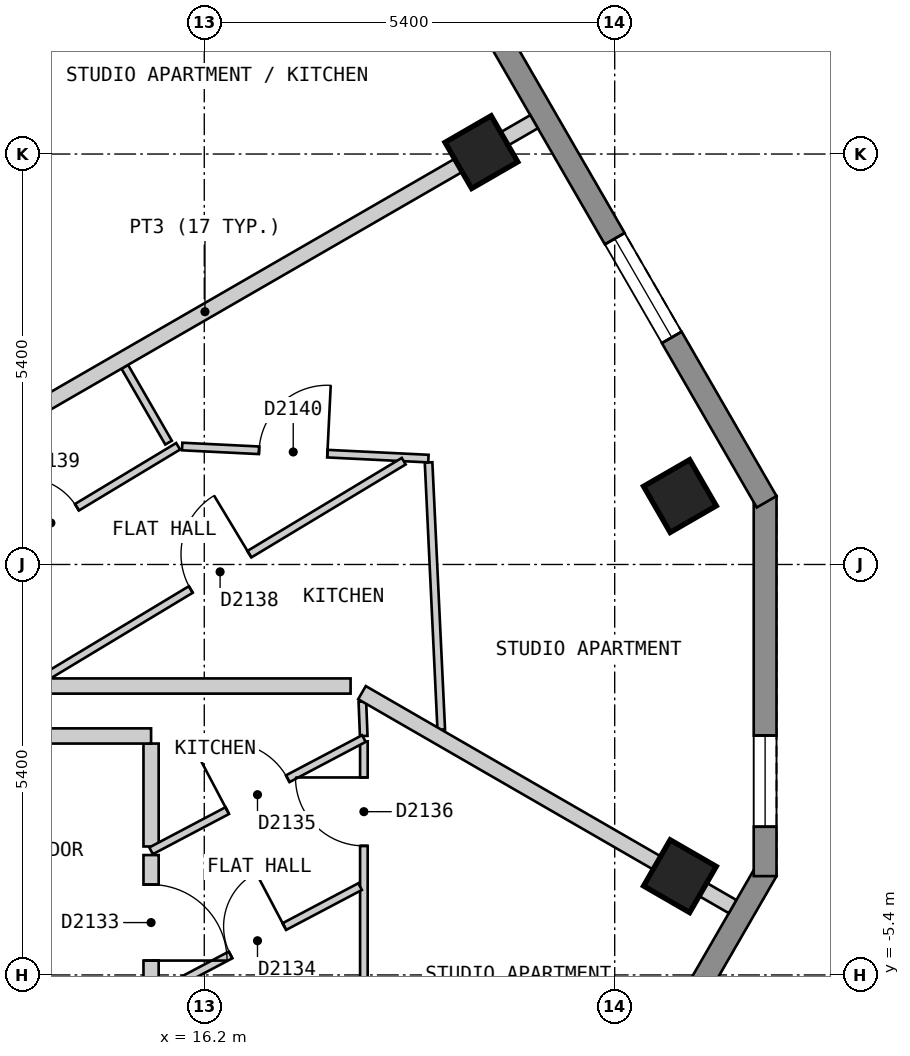
"""IFC4 building model, lengths in metres.
Left out: names, types, materials, properties, quantities, classifications, styles, units other than length and angle.
Written with IfcOpenShell. Run it as: python <this file> out.ifc"""

import sys

from ifc_helpers import new_model, si_unit, direction, frame, frame_2d, origin, origin_2d, place, context, subcontext, project, spatial, polyline, rectangle, outline, extrude, element, fill, save


model = new_model("IFC4")
c1 = context("Model", 3, precision=1e-05, world=origin(), true_north=direction((0.0, 1.0)))
c2 = subcontext(c1, "Body", "Model", "MODEL_VIEW")
j1 = project(units=[si_unit("LENGTHUNIT", "METRE"), si_unit("PLANEANGLEUNIT", "RADIAN")], contexts=[c1])
p1 = place(None, origin())
s1 = spatial("IfcSite", under=j1, at=p1, CompositionType="ELEMENT")
p2 = place(p1, origin())
s2 = spatial("IfcBuilding", under=s1, at=p2, CompositionType="ELEMENT")
p3 = place(p2, frame((0.0, 0.0, 205.8)))
s3 = spatial("IfcBuildingStorey", under=s2, at=p3, CompositionType="ELEMENT", Elevation=205.8)
for number, where, z_axis, x_axis in (
    (1, (22.458, -4.101, 0.0), (0.0, 0.0, 1.0), (0.5, 0.866, 0.0)),
    (2, (22.458, 0.9, 0.0), (0.0, 0.0, 1.0), (-0.5, 0.866, 0.0)),
    (3, (19.846, 5.425, 0.0), (0.0, 0.0, 1.0), (-0.5, 0.866, 0.0)),
):
    element("IfcColumn", number, at=place(p3, frame(where, z_axis=z_axis, x_axis=x_axis)), inside=s3, PredefinedType="COLUMN", context=c2, shape_type="SweptSolid", body=[
        extrude(rectangle(XDim=0.7, YDim=0.7, at=origin_2d()), origin(), (0.0, 0.0, 1.0), 3.0),
    ])
p4 = place(p3, frame((15.285, -18.425, 0.0), z_axis=(0.0, 0.0, 1.0), x_axis=(0.500012653391, 0.866018098222, 0.0)))
e4 = element("IfcWall", 4, at=p4, inside=s3, PredefinedType="SOLIDWALL", context=c2, shape_type="SweptSolid", body=[
    extrude(outline(polyline([(0.0, -0.15), (16.628, -0.15), (16.548, 0.15), (0.08, 0.15), (0.0, -0.15)])), origin(), (0.0, 0.0, 1.0), 2.7),
])
p5 = place(p4, frame((2.444, 0.0, 0.15)))
e5 = element("IfcOpeningElement", 5, at=p5, cuts=e4, PredefinedType="OPENING", context=c2, shape_type="SweptSolid", body=[
    extrude(rectangle(XDim=1.5, YDim=2.1, at=frame_2d((0.75, 1.05))), frame((0.0, 0.16, 0.0), z_axis=(0.0, -1.0, 0.0), x_axis=(1.0, 0.0, 0.0)), (0.0, 0.0, 1.0), 0.32),
])
p6 = place(p4, frame((7.564, 0.0, 0.15)))
e6 = element("IfcOpeningElement", 6, at=p6, cuts=e4, PredefinedType="OPENING", context=c2, shape_type="SweptSolid", body=[
    extrude(rectangle(XDim=1.5, YDim=2.1, at=frame_2d((0.75, 1.05))), frame((0.0, 0.16, 0.0), z_axis=(0.0, -1.0, 0.0), x_axis=(1.0, 0.0, 0.0)), (0.0, 0.0, 1.0), 0.32),
])
p7 = place(p4, frame((12.682, 0.0, 0.15)))
e7 = element("IfcOpeningElement", 7, at=p7, cuts=e4, PredefinedType="OPENING", context=c2, shape_type="SweptSolid", body=[
    extrude(rectangle(XDim=1.5, YDim=2.1, at=frame_2d((0.75, 1.05))), frame((0.0, 0.16, 0.0), z_axis=(0.0, -1.0, 0.0), x_axis=(1.0, 0.0, 0.0)), (0.0, 0.0, 1.0), 0.32),
])
p8 = place(p3, frame((23.579, -4.1, 0.0), z_axis=(0.0, 0.0, 1.0), x_axis=(0.0, 1.0, 0.0)))
e8 = element("IfcWall", 8, at=p8, inside=s3, PredefinedType="SOLIDWALL", context=c2, shape_type="SweptSolid", body=[
    extrude(outline(polyline([(0.0, -0.15), (5.0, -0.15), (4.92, 0.15), (0.08, 0.15), (0.0, -0.15)])), origin(), (0.0, 0.0, 1.0), 2.7),
])
p9 = place(p8, frame((0.65, 0.0, 0.15)))
e9 = element("IfcOpeningElement", 9, at=p9, cuts=e8, PredefinedType="OPENING", context=c2, shape_type="SweptSolid", body=[
    extrude(rectangle(XDim=1.2, YDim=2.1, at=frame_2d((0.6, 1.05))), frame((0.0, 0.16, 0.0), z_axis=(0.0, -1.0, 0.0), x_axis=(1.0, 0.0, 0.0)), (0.0, 0.0, 1.0), 0.32),
])
p10 = place(p3, frame((23.599, 0.825, 0.0), z_axis=(0.0, 0.0, 1.0), x_axis=(-0.500003656944, 0.866023292436, 0.0)))
e10 = element("IfcWall", 10, at=p10, inside=s3, PredefinedType="SOLIDWALL", context=c2, shape_type="SweptSolid", body=[
    extrude(outline(polyline([(0.0, -0.15), (22.17, -0.15), (22.09, 0.15), (0.08, 0.15), (0.0, -0.15)])), origin(), (0.0, 0.0, 1.0), 2.7),
])
p11 = place(p10, frame((2.497, 0.0, 0.15)))
e11 = element("IfcOpeningElement", 11, at=p11, cuts=e10, PredefinedType="OPENING", context=c2, shape_type="SweptSolid", body=[
    extrude(rectangle(XDim=1.5, YDim=2.1, at=frame_2d((0.75, 1.05))), frame((0.0, 0.16, 0.0), z_axis=(0.0, -1.0, 0.0), x_axis=(1.0, 0.0, 0.0)), (0.0, 0.0, 1.0), 0.32),
])
p12 = place(p10, frame((7.723, 0.0, 0.15)))
e12 = element("IfcOpeningElement", 12, at=p12, cuts=e10, PredefinedType="OPENING", context=c2, shape_type="SweptSolid", body=[
    extrude(rectangle(XDim=1.5, YDim=2.1, at=frame_2d((0.75, 1.05))), frame((0.0, 0.16, 0.0), z_axis=(0.0, -1.0, 0.0), x_axis=(1.0, 0.0, 0.0)), (0.0, 0.0, 1.0), 0.32),
])
p13 = place(p10, frame((12.948, 0.0, 0.15)))
e13 = element("IfcOpeningElement", 13, at=p13, cuts=e10, PredefinedType="OPENING", context=c2, shape_type="SweptSolid", body=[
    extrude(rectangle(XDim=1.5, YDim=2.1, at=frame_2d((0.75, 1.05))), frame((0.0, 0.16, 0.0), z_axis=(0.0, -1.0, 0.0), x_axis=(1.0, 0.0, 0.0)), (0.0, 0.0, 1.0), 0.32),
])
p14 = place(p10, frame((18.173, 0.0, 0.15)))
e14 = element("IfcOpeningElement", 14, at=p14, cuts=e10, PredefinedType="OPENING", context=c2, shape_type="SweptSolid", body=[
    extrude(rectangle(XDim=1.5, YDim=2.1, at=frame_2d((0.75, 1.05))), frame((0.0, 0.16, 0.0), z_axis=(0.0, -1.0, 0.0), x_axis=(1.0, 0.0, 0.0)), (0.0, 0.0, 1.0), 0.32),
])
p15 = place(p3, frame((15.5, -2.356, 0.0), z_axis=(0.0, 0.0, 1.0), x_axis=(0.0, -1.0, 0.0)))
e15 = element("IfcWall", 15, at=p15, inside=s3, PredefinedType="PARTITIONING", context=c2, shape_type="SweptSolid", body=[
    extrude(rectangle(XDim=1.354, YDim=0.2, at=frame_2d((0.677, 0.0))), origin(), (0.0, 0.0, 1.0), 2.7),
])
p16 = place(p3, frame((12.902, -2.256, 0.0), z_axis=(0.0, 0.0, 1.0), x_axis=(1.0, 0.0, 0.0)))
e16 = element("IfcWall", 16, at=p16, inside=s3, PredefinedType="PARTITIONING", context=c2, shape_type="SweptSolid", body=[
    extrude(rectangle(XDim=2.598, YDim=0.2, at=frame_2d((1.299, 0.0))), origin(), (0.0, 0.0, 1.0), 2.7),
])
p17 = place(p3, frame((15.5, -5.879, 0.0), z_axis=(0.0, 0.0, 1.0), x_axis=(0.0, 1.0, 0.0)))
e17 = element("IfcWall", 17, at=p17, inside=s3, PredefinedType="PARTITIONING", context=c2, shape_type="SweptSolid", body=[
    extrude(rectangle(XDim=2.056, YDim=0.2, at=frame_2d((1.028, 0.0))), origin(), (0.0, 0.0, 1.0), 2.7),
])
p18 = place(p17, frame((0.668, 0.0, 0.0)))
e18 = element("IfcOpeningElement", 18, at=p18, cuts=e17, PredefinedType="OPENING", context=c2, shape_type="SweptSolid", body=[
    extrude(rectangle(XDim=1.0, YDim=2.1, at=frame_2d((0.5, 1.05))), frame((0.0, 0.11, 0.0), z_axis=(0.0, -1.0, 0.0), x_axis=(1.0, 0.0, 0.0)), (0.0, 0.0, 1.0), 0.22),
])
p19 = place(p3, frame((15.154, 2.601, 0.0), z_axis=(0.0, 0.0, 1.0), x_axis=(0.499808046739, -0.866136199691, 0.0)))
e19 = element("IfcWall", 19, at=p19, inside=s3, PredefinedType="PARTITIONING", context=c2, shape_type="SweptSolid", body=[
    extrude(rectangle(XDim=1.152, YDim=0.1, at=frame_2d((0.576, 0.0))), origin(), (0.0, 0.0, 1.0), 2.7),
])
p20 = place(p3, frame((18.28, -1.804, 0.0), z_axis=(0.0, 0.0, 1.0), x_axis=(0.039839036731, -0.999206110446, 0.0)))
e20 = element("IfcWall", 20, at=p20, inside=s3, PredefinedType="PARTITIONING", context=c2, shape_type="SweptSolid", body=[
    extrude(rectangle(XDim=0.453, YDim=0.1, at=frame_2d((0.227, 0.0))), origin(), (0.0, 0.0, 1.0), 2.7),
])
p21 = place(p3, frame((19.151, 1.343, 0.0), z_axis=(0.0, 0.0, 1.0), x_axis=(0.047509130714, -0.998870803707, 0.0)))
e21 = element("IfcWall", 21, at=p21, inside=s3, PredefinedType="PARTITIONING", context=c2, shape_type="SweptSolid", body=[
    extrude(rectangle(XDim=3.52, YDim=0.1, at=frame_2d((1.76, 0.0))), origin(), (0.0, 0.0, 1.0), 2.7),
])
p22 = place(p3, frame((15.909, 1.552, 0.0), z_axis=(0.0, 0.0, 1.0), x_axis=(0.998799003463, -0.048995414909, 0.0)))
e22 = element("IfcWall", 22, at=p22, inside=s3, PredefinedType="PARTITIONING", context=c2, shape_type="SweptSolid", body=[
    extrude(rectangle(XDim=3.244, YDim=0.1, at=frame_2d((1.622, 0.0))), origin(), (0.0, 0.0, 1.0), 2.7),
])
p23 = place(p22, frame((1.013, 0.0, 0.0)))
e23 = element("IfcOpeningElement", 23, at=p23, cuts=e22, PredefinedType="OPENING", context=c2, shape_type="SweptSolid", body=[
    extrude(rectangle(XDim=0.9, YDim=2.1, at=frame_2d((0.45, 1.05))), frame((0.0, 0.06, 0.0), z_axis=(0.0, -1.0, 0.0), x_axis=(1.0, 0.0, 0.0)), (0.0, 0.0, 1.0), 0.12),
])
p24 = place(p3, frame((18.3, -7.496, 0.0), z_axis=(0.0, 0.0, 1.0), x_axis=(0.0, 1.0, 0.0)))
e24 = element("IfcWall", 24, at=p24, inside=s3, PredefinedType="PARTITIONING", context=c2, shape_type="SweptSolid", body=[
    extrude(rectangle(XDim=5.17, YDim=0.1, at=frame_2d((2.585, 0.0))), origin(), (0.0, 0.0, 1.0), 2.7),
])
p25 = place(p24, frame((3.794, 0.0, 0.0)))
e25 = element("IfcOpeningElement", 25, at=p25, cuts=e24, PredefinedType="OPENING", context=c2, shape_type="SweptSolid", body=[
    extrude(rectangle(XDim=0.9, YDim=2.1, at=frame_2d((0.45, 1.05))), frame((0.0, 0.06, 0.0), z_axis=(0.0, -1.0, 0.0), x_axis=(1.0, 0.0, 0.0)), (0.0, 0.0, 1.0), 0.12),
])
p26 = place(p3, frame((15.5, -3.767, 0.0), z_axis=(0.0, 0.0, 1.0), x_axis=(0.884482889541, 0.466572628976, 0.0)))
e26 = element("IfcWall", 26, at=p26, inside=s3, PredefinedType="PARTITIONING", context=c2, shape_type="SweptSolid", body=[
    extrude(rectangle(XDim=3.166, YDim=0.1, at=frame_2d((1.583, 0.0))), origin(), (0.0, 0.0, 1.0), 2.7),
])
p27 = place(p26, frame((1.133, 0.0, 0.0)))
e27 = element("IfcOpeningElement", 27, at=p27, cuts=e26, PredefinedType="OPENING", context=c2, shape_type="SweptSolid", body=[
    extrude(rectangle(XDim=0.9, YDim=2.1, at=frame_2d((0.45, 1.05))), frame((0.0, 0.06, 0.0), z_axis=(0.0, -1.0, 0.0), x_axis=(1.0, 0.0, 0.0)), (0.0, 0.0, 1.0), 0.12),
])
p28 = place(p3, frame((15.6, -5.636, 0.0), z_axis=(0.0, 0.0, 1.0), x_axis=(0.884468832747, 0.466599275503, 0.0)))
e28 = element("IfcWall", 28, at=p28, inside=s3, PredefinedType="PARTITIONING", context=c2, shape_type="SweptSolid", body=[
    extrude(rectangle(XDim=2.996, YDim=0.1, at=frame_2d((1.498, 0.0))), origin(), (0.0, 0.0, 1.0), 2.7),
])
p29 = place(p28, frame((1.07, 0.0, 0.0)))
e29 = element("IfcOpeningElement", 29, at=p29, cuts=e28, PredefinedType="OPENING", context=c2, shape_type="SweptSolid", body=[
    extrude(rectangle(XDim=0.8, YDim=2.1, at=frame_2d((0.4, 1.05))), frame((0.0, 0.06, 0.0), z_axis=(0.0, -1.0, 0.0), x_axis=(1.0, 0.0, 0.0)), (0.0, 0.0, 1.0), 0.12),
])
p30 = place(p3, frame((12.593, -0.411, 0.0), z_axis=(0.0, 0.0, 1.0), x_axis=(0.856558445359, 0.516050026339, 0.0)))
e30 = element("IfcWall", 30, at=p30, inside=s3, PredefinedType="PARTITIONING", context=c2, shape_type="SweptSolid", body=[
    extrude(rectangle(XDim=3.809, YDim=0.1, at=frame_2d((1.905, 0.0))), origin(), (0.0, 0.0, 1.0), 2.7),
])
p31 = place(p30, frame((1.455, 0.0, 0.0)))
e31 = element("IfcOpeningElement", 31, at=p31, cuts=e30, PredefinedType="OPENING", context=c2, shape_type="SweptSolid", body=[
    extrude(rectangle(XDim=0.8, YDim=2.1, at=frame_2d((0.4, 1.05))), frame((0.0, 0.06, 0.0), z_axis=(0.0, -1.0, 0.0), x_axis=(1.0, 0.0, 0.0)), (0.0, 0.0, 1.0), 0.12),
])
p32 = place(p3, frame((14.081, -1.499, 0.0), z_axis=(0.0, 0.0, 1.0), x_axis=(0.85652273816, 0.516109289798, 0.0)))
e32 = element("IfcWall", 32, at=p32, inside=s3, PredefinedType="PARTITIONING", context=c2, shape_type="SweptSolid", body=[
    extrude(rectangle(XDim=5.537, YDim=0.1, at=frame_2d((2.769, 0.0))), origin(), (0.0, 0.0, 1.0), 2.7),
])
p33 = place(p32, frame((2.267, 0.0, 0.0)))
e33 = element("IfcOpeningElement", 33, at=p33, cuts=e32, PredefinedType="OPENING", context=c2, shape_type="SweptSolid", body=[
    extrude(rectangle(XDim=0.9, YDim=2.1, at=frame_2d((0.45, 1.05))), frame((0.0, 0.06, 0.0), z_axis=(0.0, -1.0, 0.0), x_axis=(1.0, 0.0, 0.0)), (0.0, 0.0, 1.0), 0.12),
])
p34 = place(p3, frame((18.275, -1.686, 0.0), z_axis=(0.0, 0.0, 1.0), x_axis=(0.866041167766, -0.49997269499, 0.0)))
e34 = element("IfcWall", 34, at=p34, inside=s3, PredefinedType="PARTITIONING", context=c2, shape_type="SweptSolid", body=[
    extrude(rectangle(XDim=5.63, YDim=0.2, at=frame_2d((2.815, 0.0))), origin(), (0.0, 0.0, 1.0), 2.7),
])
p35 = place(p3, frame((13.163, -1.599, 0.0), z_axis=(0.0, 0.0, 1.0), x_axis=(1.0, 0.0, 0.0)))
e35 = element("IfcWall", 35, at=p35, inside=s3, PredefinedType="PARTITIONING", context=c2, shape_type="SweptSolid", body=[
    extrude(rectangle(XDim=4.962, YDim=0.2, at=frame_2d((2.481, 0.0))), origin(), (0.0, 0.0, 1.0), 2.7),
])
p36 = place(p3, frame((11.879, 0.826, 0.0), z_axis=(0.0, 0.0, 1.0), x_axis=(0.866065245018, 0.499930986609, 0.0)))
e36 = element("IfcWall", 36, at=p36, inside=s3, PredefinedType="PARTITIONING", context=c2, shape_type="SweptSolid", body=[
    extrude(rectangle(XDim=10.0, YDim=0.2, at=frame_2d((5.0, 0.0))), origin(), (0.0, 0.0, 1.0), 2.7),
])
p37 = place(p3, frame((9.354, 5.401, 0.0), z_axis=(0.0, 0.0, 1.0), x_axis=(0.866018411306, 0.500012111133, 0.0)))
e37 = element("IfcWall", 37, at=p37, inside=s3, PredefinedType="PARTITIONING", context=c2, shape_type="SweptSolid", body=[
    extrude(rectangle(XDim=9.898, YDim=0.2, at=frame_2d((4.949, 0.0))), origin(), (0.0, 0.0, 1.0), 2.7),
])
p38 = place(p9, origin())
e38 = element("IfcWindow", 38, at=p38, inside=s3, PartitioningType="SINGLE_PANEL", PredefinedType="WINDOW", context=c2, shape_type="SweptSolid", body=[
    extrude(rectangle(XDim=1.2, YDim=2.1, at=frame_2d((0.6, 1.05))), frame((0.0, 0.03, 0.0), z_axis=(0.0, -1.0, 0.0), x_axis=(1.0, 0.0, 0.0)), (0.0, 0.0, 1.0), 0.06),
])
fill(e9, e38)
p39 = place(p11, origin())
e39 = element("IfcWindow", 39, at=p39, inside=s3, PartitioningType="SINGLE_PANEL", PredefinedType="WINDOW", context=c2, shape_type="SweptSolid", body=[
    extrude(rectangle(XDim=1.5, YDim=2.1, at=frame_2d((0.75, 1.05))), frame((0.0, 0.03, 0.0), z_axis=(0.0, -1.0, 0.0), x_axis=(1.0, 0.0, 0.0)), (0.0, 0.0, 1.0), 0.06),
])
fill(e11, e39)
p40 = place(p18, origin())
e40 = element("IfcDoor", 40, at=p40, inside=s3, OperationType="SINGLE_SWING_LEFT", PredefinedType="DOOR", context=c2, shape_type="SweptSolid", body=[
    extrude(rectangle(XDim=1.0, YDim=2.1, at=frame_2d((0.5, 1.05))), frame((0.0, 0.025, 0.0), z_axis=(0.0, -1.0, 0.0), x_axis=(1.0, 0.0, 0.0)), (0.0, 0.0, 1.0), 0.05),
])
fill(e18, e40)
p41 = place(p29, origin())
e41 = element("IfcDoor", 41, at=p41, inside=s3, OperationType="SINGLE_SWING_RIGHT", PredefinedType="DOOR", context=c2, shape_type="SweptSolid", body=[
    extrude(rectangle(XDim=0.8, YDim=2.1, at=frame_2d((0.4, 1.05))), frame((0.0, 0.025, 0.0), z_axis=(0.0, -1.0, 0.0), x_axis=(1.0, 0.0, 0.0)), (0.0, 0.0, 1.0), 0.05),
])
fill(e29, e41)
p42 = place(p27, origin())
e42 = element("IfcDoor", 42, at=p42, inside=s3, OperationType="SINGLE_SWING_LEFT", PredefinedType="DOOR", context=c2, shape_type="SweptSolid", body=[
    extrude(rectangle(XDim=0.9, YDim=2.1, at=frame_2d((0.45, 1.05))), frame((0.0, 0.025, 0.0), z_axis=(0.0, -1.0, 0.0), x_axis=(1.0, 0.0, 0.0)), (0.0, 0.0, 1.0), 0.05),
])
fill(e27, e42)
p43 = place(p25, origin())
e43 = element("IfcDoor", 43, at=p43, inside=s3, OperationType="SINGLE_SWING_RIGHT", PredefinedType="DOOR", context=c2, shape_type="SweptSolid", body=[
    extrude(rectangle(XDim=0.9, YDim=2.1, at=frame_2d((0.45, 1.05))), frame((0.0, 0.025, 0.0), z_axis=(0.0, -1.0, 0.0), x_axis=(1.0, 0.0, 0.0)), (0.0, 0.0, 1.0), 0.05),
])
fill(e25, e43)
p44 = place(p33, origin())
e44 = element("IfcDoor", 44, at=p44, inside=s3, OperationType="SINGLE_SWING_RIGHT", PredefinedType="DOOR", context=c2, shape_type="SweptSolid", body=[
    extrude(rectangle(XDim=0.9, YDim=2.1, at=frame_2d((0.45, 1.05))), frame((0.0, 0.025, 0.0), z_axis=(0.0, -1.0, 0.0), x_axis=(1.0, 0.0, 0.0)), (0.0, 0.0, 1.0), 0.05),
])
fill(e33, e44)
p45 = place(p31, origin())
e45 = element("IfcDoor", 45, at=p45, inside=s3, OperationType="SINGLE_SWING_LEFT", PredefinedType="DOOR", context=c2, shape_type="SweptSolid", body=[
    extrude(rectangle(XDim=0.8, YDim=2.1, at=frame_2d((0.4, 1.05))), frame((0.0, 0.025, 0.0), z_axis=(0.0, -1.0, 0.0), x_axis=(1.0, 0.0, 0.0)), (0.0, 0.0, 1.0), 0.05),
])
fill(e31, e45)
p46 = place(p23, origin())
e46 = element("IfcDoor", 46, at=p46, inside=s3, OperationType="SINGLE_SWING_RIGHT", PredefinedType="DOOR", context=c2, shape_type="SweptSolid", body=[
    extrude(rectangle(XDim=0.9, YDim=2.1, at=frame_2d((0.45, 1.05))), frame((0.0, 0.025, 0.0), z_axis=(0.0, -1.0, 0.0), x_axis=(1.0, 0.0, 0.0)), (0.0, 0.0, 1.0), 0.05),
])
fill(e23, e46)
save(model, sys.argv[1])
